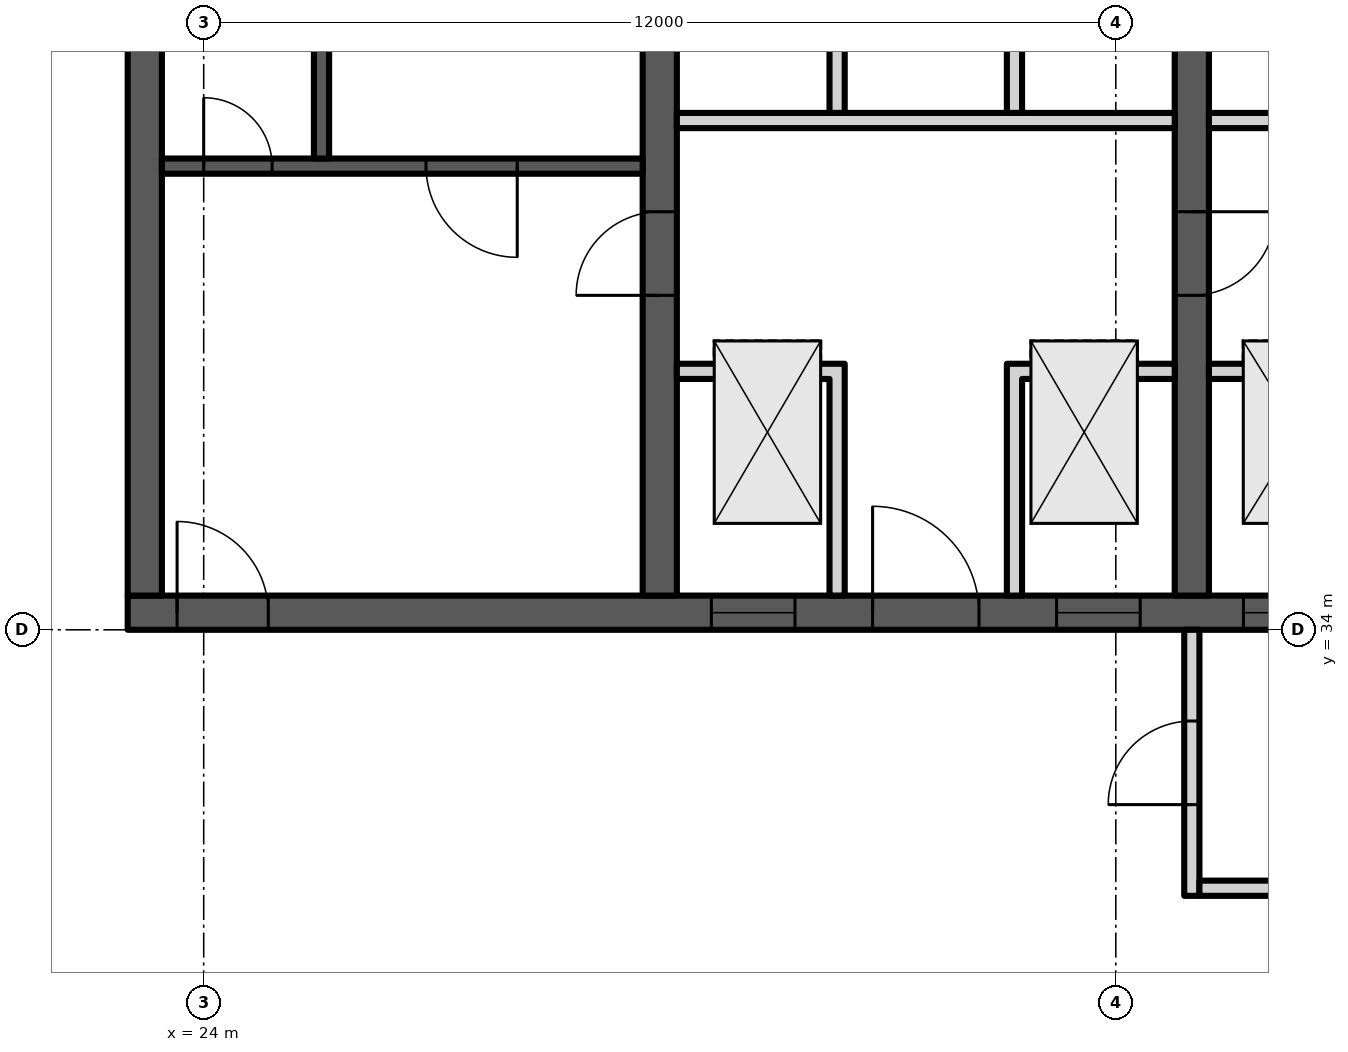
"""IFC4 building model, lengths in metres.
Left out: names, types, materials, properties, quantities, classifications, styles, units other than length and angle.
Written with IfcOpenShell. Run it as: python <this file> out.ifc"""

import sys

from ifc_helpers import new_model, si_unit, direction, frame, frame_2d, origin, place, context, subcontext, project, spatial, polyline, rectangle, outline, extrude, element, fill, save


model = new_model("IFC4")
c1 = context("Model", 3, precision=1e-05, world=origin(), true_north=direction((0.0, 1.0)))
c2 = subcontext(c1, "Body", "Model", "MODEL_VIEW")
j1 = project(units=[si_unit("LENGTHUNIT", "METRE"), si_unit("PLANEANGLEUNIT", "RADIAN")], contexts=[c1])
p1 = place(None, origin())
s1 = spatial("IfcSite", under=j1, at=p1, CompositionType="ELEMENT")
p2 = place(p1, origin())
s2 = spatial("IfcBuilding", under=s1, at=p2, CompositionType="ELEMENT")
p3 = place(p2, frame((0.0, 0.0, 261.1)))
s3 = spatial("IfcBuildingStorey", under=s2, at=p3, CompositionType="ELEMENT", Elevation=261.1)
p4 = place(p3, frame((23.0, 34.225, 0.0), z_axis=(0.0, 0.0, 1.0), x_axis=(1.0, 0.0, 0.0)))
e1 = element("IfcWall", 1, at=p4, inside=s3, PredefinedType="SHEAR", context=c2, shape_type="SweptSolid", body=[
    extrude(outline(polyline([(0.0, 0.0), (35.0, 0.0), (35.0, 3.2), (30.625, 3.2), (26.25, 3.2), (21.875, 3.2), (17.5, 3.2), (13.125, 3.2), (8.75, 3.2), (4.375, 3.2), (0.0, 2.365), (0.0, 0.0)])), frame((0.0, 0.225, 0.0), z_axis=(0.0, -1.0, 0.0), x_axis=(1.0, 0.0, 0.0)), (0.0, 0.0, 1.0), 0.45),
])
p5 = place(p4, frame((0.65, 0.0, 0.0)))
e2 = element("IfcOpeningElement", 2, at=p5, cuts=e1, PredefinedType="OPENING", context=c2, shape_type="SweptSolid", body=[
    extrude(rectangle(XDim=1.2, YDim=2.1, at=frame_2d((0.6, 1.05))), frame((0.0, 0.235, 0.0), z_axis=(0.0, -1.0, 0.0), x_axis=(1.0, 0.0, 0.0)), (0.0, 0.0, 1.0), 0.47),
])
p6 = place(p4, frame((7.679, 0.0, 0.0)))
e3 = element("IfcOpeningElement", 3, at=p6, cuts=e1, PredefinedType="OPENING", context=c2, shape_type="SweptSolid", body=[
    extrude(rectangle(XDim=1.1, YDim=2.1, at=frame_2d((0.55, 1.05))), frame((0.0, 0.235, 0.0), z_axis=(0.0, -1.0, 0.0), x_axis=(1.0, 0.0, 0.0)), (0.0, 0.0, 1.0), 0.47),
])
p7 = place(p4, frame((12.221, 0.0, 0.0)))
e4 = element("IfcOpeningElement", 4, at=p7, cuts=e1, PredefinedType="OPENING", context=c2, shape_type="SweptSolid", body=[
    extrude(rectangle(XDim=1.1, YDim=2.1, at=frame_2d((0.55, 1.05))), frame((0.0, 0.235, 0.0), z_axis=(0.0, -1.0, 0.0), x_axis=(1.0, 0.0, 0.0)), (0.0, 0.0, 1.0), 0.47),
])
p8 = place(p4, frame((9.8, 0.0, 0.0)))
e5 = element("IfcOpeningElement", 5, at=p8, cuts=e1, PredefinedType="OPENING", context=c2, shape_type="SweptSolid", body=[
    extrude(rectangle(XDim=1.4, YDim=2.1, at=frame_2d((0.7, 1.05))), frame((0.0, 0.235, 0.0), z_axis=(0.0, -1.0, 0.0), x_axis=(1.0, 0.0, 0.0)), (0.0, 0.0, 1.0), 0.47),
])
p9 = place(p4, frame((14.679, 0.0, 0.0)))
e6 = element("IfcOpeningElement", 6, at=p9, cuts=e1, PredefinedType="OPENING", context=c2, shape_type="SweptSolid", body=[
    extrude(rectangle(XDim=1.1, YDim=2.1, at=frame_2d((0.55, 1.05))), frame((0.0, 0.235, 0.0), z_axis=(0.0, -1.0, 0.0), x_axis=(1.0, 0.0, 0.0)), (0.0, 0.0, 1.0), 0.47),
])
p10 = place(p4, frame((19.221, 0.0, 0.0)))
e7 = element("IfcOpeningElement", 7, at=p10, cuts=e1, PredefinedType="OPENING", context=c2, shape_type="SweptSolid", body=[
    extrude(rectangle(XDim=1.1, YDim=2.1, at=frame_2d((0.55, 1.05))), frame((0.0, 0.235, 0.0), z_axis=(0.0, -1.0, 0.0), x_axis=(1.0, 0.0, 0.0)), (0.0, 0.0, 1.0), 0.47),
])
p11 = place(p4, frame((26.15, 0.0, 0.0)))
e8 = element("IfcOpeningElement", 8, at=p11, cuts=e1, PredefinedType="OPENING", context=c2, shape_type="SweptSolid", body=[
    extrude(rectangle(XDim=1.2, YDim=2.1, at=frame_2d((0.6, 1.05))), frame((0.0, 0.235, 0.0), z_axis=(0.0, -1.0, 0.0), x_axis=(1.0, 0.0, 0.0)), (0.0, 0.0, 1.0), 0.47),
])
p12 = place(p4, frame((28.729, 0.0, 0.0)))
e9 = element("IfcOpeningElement", 9, at=p12, cuts=e1, PredefinedType="OPENING", context=c2, shape_type="SweptSolid", body=[
    extrude(rectangle(XDim=1.0, YDim=2.1, at=frame_2d((0.5, 1.05))), frame((0.0, 0.235, 0.0), z_axis=(0.0, -1.0, 0.0), x_axis=(1.0, 0.0, 0.0)), (0.0, 0.0, 1.0), 0.47),
])
p13 = place(p4, frame((33.271, 0.0, 0.0)))
e10 = element("IfcOpeningElement", 10, at=p13, cuts=e1, PredefinedType="OPENING", context=c2, shape_type="SweptSolid", body=[
    extrude(rectangle(XDim=1.0, YDim=2.1, at=frame_2d((0.5, 1.05))), frame((0.0, 0.235, 0.0), z_axis=(0.0, -1.0, 0.0), x_axis=(1.0, 0.0, 0.0)), (0.0, 0.0, 1.0), 0.47),
])
p14 = place(p4, frame((30.8, 0.0, 0.0)))
e11 = element("IfcOpeningElement", 11, at=p14, cuts=e1, PredefinedType="OPENING", context=c2, shape_type="SweptSolid", body=[
    extrude(rectangle(XDim=1.4, YDim=2.1, at=frame_2d((0.7, 1.05))), frame((0.0, 0.235, 0.0), z_axis=(0.0, -1.0, 0.0), x_axis=(1.0, 0.0, 0.0)), (0.0, 0.0, 1.0), 0.47),
])
p15 = place(p3, frame((23.225, 34.45, 0.0), z_axis=(0.0, 0.0, 1.0), x_axis=(0.0, 1.0, 0.0)))
e12 = element("IfcWall", 12, at=p15, inside=s3, PredefinedType="SHEAR", context=c2, shape_type="SweptSolid", body=[
    extrude(rectangle(XDim=13.886, YDim=0.45, at=frame_2d((6.943, 0.0))), origin(), (0.0, 0.0, 1.0), 2.456),
])
p16 = place(p3, frame((30.0, 34.45, 0.0), z_axis=(0.0, 0.0, 1.0), x_axis=(0.0, 1.0, 0.0)))
e13 = element("IfcWall", 13, at=p16, inside=s3, PredefinedType="SHEAR", context=c2, shape_type="SweptSolid", body=[
    extrude(rectangle(XDim=14.479, YDim=0.45, at=frame_2d((7.239, 0.0))), origin(), (0.0, 0.0, 1.0), 3.2),
])
p17 = place(p16, frame((3.95, 0.0, 0.0)))
e14 = element("IfcOpeningElement", 14, at=p17, cuts=e13, PredefinedType="OPENING", context=c2, shape_type="SweptSolid", body=[
    extrude(rectangle(XDim=1.1, YDim=2.1, at=frame_2d((0.55, 1.05))), frame((0.0, 0.235, 0.0), z_axis=(0.0, -1.0, 0.0), x_axis=(1.0, 0.0, 0.0)), (0.0, 0.0, 1.0), 0.47),
])
p18 = place(p3, frame((37.0, 34.45, 0.0), z_axis=(0.0, 0.0, 1.0), x_axis=(0.0, 1.0, 0.0)))
e15 = element("IfcWall", 15, at=p18, inside=s3, PredefinedType="SHEAR", context=c2, shape_type="SweptSolid", body=[
    extrude(rectangle(XDim=15.091, YDim=0.45, at=frame_2d((7.545, 0.0))), origin(), (0.0, 0.0, 1.0), 3.2),
])
p19 = place(p18, frame((11.524, 0.0, 0.0)))
e16 = element("IfcOpeningElement", 16, at=p19, cuts=e15, PredefinedType="OPENING", context=c2, shape_type="SweptSolid", body=[
    extrude(rectangle(XDim=1.0, YDim=2.1, at=frame_2d((0.5, 1.05))), frame((0.0, 0.235, 0.0), z_axis=(0.0, -1.0, 0.0), x_axis=(1.0, 0.0, 0.0)), (0.0, 0.0, 1.0), 0.47),
])
p20 = place(p18, frame((3.95, 0.0, 0.0)))
e17 = element("IfcOpeningElement", 17, at=p20, cuts=e15, PredefinedType="OPENING", context=c2, shape_type="SweptSolid", body=[
    extrude(rectangle(XDim=1.1, YDim=2.1, at=frame_2d((0.55, 1.05))), frame((0.0, 0.235, 0.0), z_axis=(0.0, -1.0, 0.0), x_axis=(1.0, 0.0, 0.0)), (0.0, 0.0, 1.0), 0.47),
])
p21 = place(p3, frame((23.45, 40.1, 0.0), z_axis=(0.0, 0.0, 1.0), x_axis=(1.0, 0.0, 0.0)))
e18 = element("IfcWall", 18, at=p21, inside=s3, PredefinedType="SHEAR", context=c2, shape_type="SweptSolid", body=[
    extrude(rectangle(XDim=6.325, YDim=0.2, at=frame_2d((3.163, 0.0))), origin(), (0.0, 0.0, 1.0), 2.8),
])
p22 = place(p21, frame((3.475, 0.0, 0.0)))
e19 = element("IfcOpeningElement", 19, at=p22, cuts=e18, PredefinedType="OPENING", context=c2, shape_type="SweptSolid", body=[
    extrude(rectangle(XDim=1.2, YDim=2.1, at=frame_2d((0.6, 1.05))), frame((0.0, 0.11, 0.0), z_axis=(0.0, -1.0, 0.0), x_axis=(1.0, 0.0, 0.0)), (0.0, 0.0, 1.0), 0.22),
])
p23 = place(p21, frame((0.55, 0.0, 0.0)))
e20 = element("IfcOpeningElement", 20, at=p23, cuts=e18, PredefinedType="OPENING", context=c2, shape_type="SweptSolid", body=[
    extrude(rectangle(XDim=0.9, YDim=2.1, at=frame_2d((0.45, 1.05))), frame((0.0, 0.11, 0.0), z_axis=(0.0, -1.0, 0.0), x_axis=(1.0, 0.0, 0.0)), (0.0, 0.0, 1.0), 0.22),
])
p24 = place(p3, frame((25.55, 40.2, 0.0), z_axis=(0.0, 0.0, 1.0), x_axis=(0.0, 1.0, 0.0)))
e21 = element("IfcWall", 21, at=p24, inside=s3, PredefinedType="SHEAR", context=c2, shape_type="SweptSolid", body=[
    extrude(rectangle(XDim=7.2, YDim=0.2, at=frame_2d((3.6, 0.0))), origin(), (0.0, 0.0, 1.0), 2.8),
])
p25 = place(p3, frame((30.225, 40.7, 0.0), z_axis=(0.0, 0.0, 1.0), x_axis=(1.0, 0.0, 0.0)))
e22 = element("IfcWall", 22, at=p25, inside=s3, PredefinedType="PARTITIONING", context=c2, shape_type="SweptSolid", body=[
    extrude(rectangle(XDim=6.55, YDim=0.2, at=frame_2d((3.275, 0.0))), origin(), (0.0, 0.0, 1.0), 2.8),
])
p26 = place(p3, frame((0.0, 0.0, -0.0)))
e23 = element("IfcWall", 23, at=p26, inside=s3, PredefinedType="PARTITIONING", context=c2, shape_type="SweptSolid", body=[
    extrude(outline(polyline([(32.233, 37.3), (30.225, 37.3), (30.225, 37.5), (32.233, 37.5), (32.433, 37.5), (32.433, 34.45), (32.233, 34.45), (32.233, 37.3)])), origin(), (0.0, 0.0, 1.0), 2.8),
])
p27 = place(p3, frame((0.0, 0.0, -0.0)))
e24 = element("IfcWall", 24, at=p27, inside=s3, PredefinedType="PARTITIONING", context=c2, shape_type="SweptSolid", body=[
    extrude(outline(polyline([(34.567, 37.5), (34.767, 37.5), (36.775, 37.5), (36.775, 37.3), (34.767, 37.3), (34.767, 34.45), (34.567, 34.45), (34.567, 37.5)])), origin(), (0.0, 0.0, 1.0), 2.8),
])
p28 = place(p3, frame((0.0, 0.0, -0.0)))
e25 = element("IfcWall", 25, at=p28, inside=s3, PredefinedType="PARTITIONING", context=c2, shape_type="SweptSolid", body=[
    extrude(outline(polyline([(32.433, 40.8), (32.233, 40.8), (32.233, 43.8), (30.225, 43.8), (30.225, 44.0), (36.775, 44.0), (36.775, 43.8), (34.767, 43.8), (34.767, 40.8), (34.567, 40.8), (34.567, 43.8), (32.433, 43.8), (32.433, 40.8)])), origin(), (0.0, 0.0, 1.0), 2.8),
])
p29 = place(p3, frame((37.225, 40.7, 0.0), z_axis=(0.0, 0.0, 1.0), x_axis=(1.0, 0.0, 0.0)))
e26 = element("IfcWall", 26, at=p29, inside=s3, PredefinedType="PARTITIONING", context=c2, shape_type="SweptSolid", body=[
    extrude(rectangle(XDim=6.55, YDim=0.2, at=frame_2d((3.275, 0.0))), origin(), (0.0, 0.0, 1.0), 2.8),
])
p30 = place(p3, frame((0.0, 0.0, -0.0)))
e27 = element("IfcWall", 27, at=p30, inside=s3, PredefinedType="PARTITIONING", context=c2, shape_type="SweptSolid", body=[
    extrude(outline(polyline([(41.567, 37.1), (39.433, 37.1), (39.433, 34.45), (39.233, 34.45), (39.233, 37.3), (37.225, 37.3), (37.225, 37.5), (39.233, 37.5), (39.433, 37.5), (39.433, 37.3), (41.567, 37.3), (41.767, 37.3), (43.775, 37.3), (43.775, 37.1), (41.767, 37.1), (41.767, 34.45), (41.567, 34.45), (41.567, 37.1)])), origin(), (0.0, 0.0, 1.0), 2.8),
])
p31 = place(p3, frame((0.0, 0.0, -0.0)))
e28 = element("IfcWall", 28, at=p31, inside=s3, PredefinedType="PARTITIONING", context=c2, shape_type="SweptSolid", body=[
    extrude(outline(polyline([(39.433, 40.8), (39.233, 40.8), (39.233, 43.8), (37.225, 43.8), (37.225, 44.0), (43.775, 44.0), (43.775, 43.8), (41.767, 43.8), (41.767, 40.8), (41.567, 40.8), (41.567, 43.8), (39.433, 43.8), (39.433, 40.8)])), origin(), (0.0, 0.0, 1.0), 2.8),
])
p32 = place(p3, frame((37.0, 30.5, 0.0), z_axis=(0.0, 0.0, 1.0), x_axis=(0.0, 1.0, 0.0)))
e29 = element("IfcWall", 29, at=p32, inside=s3, PredefinedType="PARTITIONING", context=c2, shape_type="SweptSolid", body=[
    extrude(rectangle(XDim=3.5, YDim=0.2, at=frame_2d((1.75, 0.0))), origin(), (0.0, 0.0, 1.0), 2.8),
])
p33 = place(p32, frame((1.2, 0.0, 0.0)))
e30 = element("IfcOpeningElement", 30, at=p33, cuts=e29, PredefinedType="OPENING", context=c2, shape_type="SweptSolid", body=[
    extrude(rectangle(XDim=1.1, YDim=2.1, at=frame_2d((0.55, 1.05))), frame((0.0, 0.11, 0.0), z_axis=(0.0, -1.0, 0.0), x_axis=(1.0, 0.0, 0.0)), (0.0, 0.0, 1.0), 0.22),
])
p34 = place(p3, frame((37.1, 30.6, 0.0), z_axis=(0.0, 0.0, 1.0), x_axis=(1.0, 0.0, 0.0)))
e31 = element("IfcWall", 31, at=p34, inside=s3, PredefinedType="PARTITIONING", context=c2, shape_type="SweptSolid", body=[
    extrude(rectangle(XDim=2.8, YDim=0.2, at=frame_2d((1.4, 0.0))), origin(), (0.0, 0.0, 1.0), 2.8),
])
p35 = place(p22, origin())
e32 = element("IfcDoor", 32, at=p35, inside=s3, OperationType="SINGLE_SWING_RIGHT", PredefinedType="DOOR", context=c2, shape_type="SweptSolid", body=[
    extrude(rectangle(XDim=1.2, YDim=2.1, at=frame_2d((0.6, 1.05))), frame((0.0, 0.025, 0.0), z_axis=(0.0, -1.0, 0.0), x_axis=(1.0, 0.0, 0.0)), (0.0, 0.0, 1.0), 0.05),
])
fill(e19, e32)
p36 = place(p23, origin())
e33 = element("IfcDoor", 33, at=p36, inside=s3, OperationType="SINGLE_SWING_LEFT", PredefinedType="DOOR", context=c2, shape_type="SweptSolid", body=[
    extrude(rectangle(XDim=0.9, YDim=2.1, at=frame_2d((0.45, 1.05))), frame((0.0, 0.025, 0.0), z_axis=(0.0, -1.0, 0.0), x_axis=(1.0, 0.0, 0.0)), (0.0, 0.0, 1.0), 0.05),
])
fill(e20, e33)
p37 = place(p5, origin())
e34 = element("IfcDoor", 34, at=p37, inside=s3, OperationType="SINGLE_SWING_LEFT", PredefinedType="DOOR", context=c2, shape_type="SweptSolid", body=[
    extrude(rectangle(XDim=1.2, YDim=2.1, at=frame_2d((0.6, 1.05))), frame((0.0, 0.025, 0.0), z_axis=(0.0, -1.0, 0.0), x_axis=(1.0, 0.0, 0.0)), (0.0, 0.0, 1.0), 0.05),
])
fill(e2, e34)
p38 = place(p6, origin())
e35 = element("IfcDoor", 35, at=p38, inside=s3, OperationType="DOUBLE_DOOR_SLIDING", PredefinedType="DOOR", context=c2, shape_type="SweptSolid", body=[
    extrude(rectangle(XDim=1.1, YDim=2.1, at=frame_2d((0.55, 1.05))), frame((0.0, 0.025, 0.0), z_axis=(0.0, -1.0, 0.0), x_axis=(1.0, 0.0, 0.0)), (0.0, 0.0, 1.0), 0.05),
])
fill(e3, e35)
p39 = place(p7, origin())
e36 = element("IfcDoor", 36, at=p39, inside=s3, OperationType="DOUBLE_DOOR_SLIDING", PredefinedType="DOOR", context=c2, shape_type="SweptSolid", body=[
    extrude(rectangle(XDim=1.1, YDim=2.1, at=frame_2d((0.55, 1.05))), frame((0.0, 0.025, 0.0), z_axis=(0.0, -1.0, 0.0), x_axis=(1.0, 0.0, 0.0)), (0.0, 0.0, 1.0), 0.05),
])
fill(e4, e36)
p40 = place(p8, origin())
e37 = element("IfcDoor", 37, at=p40, inside=s3, OperationType="DOUBLE_DOOR_SINGLE_SWING", PredefinedType="DOOR", context=c2, shape_type="SweptSolid", body=[
    extrude(rectangle(XDim=1.4, YDim=2.1, at=frame_2d((0.7, 1.05))), frame((0.0, 0.025, 0.0), z_axis=(0.0, -1.0, 0.0), x_axis=(1.0, 0.0, 0.0)), (0.0, 0.0, 1.0), 0.05),
])
fill(e5, e37)
p41 = place(p9, origin())
e38 = element("IfcDoor", 38, at=p41, inside=s3, OperationType="DOUBLE_DOOR_SLIDING", PredefinedType="DOOR", context=c2, shape_type="SweptSolid", body=[
    extrude(rectangle(XDim=1.1, YDim=2.1, at=frame_2d((0.55, 1.05))), frame((0.0, 0.025, 0.0), z_axis=(0.0, -1.0, 0.0), x_axis=(1.0, 0.0, 0.0)), (0.0, 0.0, 1.0), 0.05),
])
fill(e6, e38)
p42 = place(p17, origin())
e39 = element("IfcDoor", 39, at=p42, inside=s3, OperationType="SINGLE_SWING_LEFT", PredefinedType="DOOR", context=c2, shape_type="SweptSolid", body=[
    extrude(rectangle(XDim=1.1, YDim=2.1, at=frame_2d((0.55, 1.05))), frame((0.0, 0.025, 0.0), z_axis=(0.0, -1.0, 0.0), x_axis=(1.0, 0.0, 0.0)), (0.0, 0.0, 1.0), 0.05),
])
fill(e14, e39)
p43 = place(p20, origin())
e40 = element("IfcDoor", 40, at=p43, inside=s3, OperationType="SINGLE_SWING_RIGHT", PredefinedType="DOOR", context=c2, shape_type="SweptSolid", body=[
    extrude(rectangle(XDim=1.1, YDim=2.1, at=frame_2d((0.55, 1.05))), frame((0.0, 0.025, 0.0), z_axis=(0.0, -1.0, 0.0), x_axis=(1.0, 0.0, 0.0)), (0.0, 0.0, 1.0), 0.05),
])
fill(e17, e40)
p44 = place(p33, origin())
e41 = element("IfcDoor", 41, at=p44, inside=s3, OperationType="SINGLE_SWING_LEFT", PredefinedType="DOOR", context=c2, shape_type="SweptSolid", body=[
    extrude(rectangle(XDim=1.1, YDim=2.1, at=frame_2d((0.55, 1.05))), frame((0.0, 0.025, 0.0), z_axis=(0.0, -1.0, 0.0), x_axis=(1.0, 0.0, 0.0)), (0.0, 0.0, 1.0), 0.05),
])
fill(e30, e41)
save(model, sys.argv[1])
